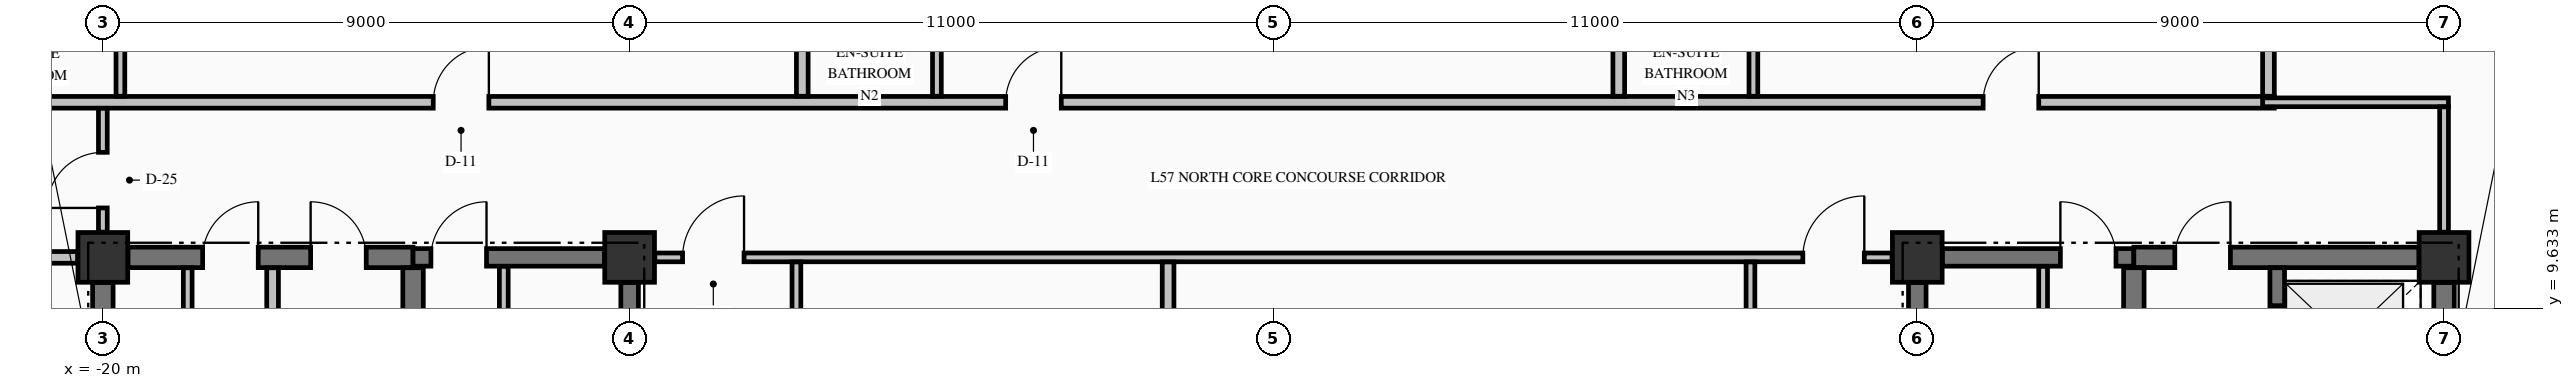
"""IFC4 building model, lengths in metres.
Left out: names, types, materials, properties, quantities, classifications, styles, units other than length and angle.
Written with IfcOpenShell. Run it as: python <this file> out.ifc"""

import sys

from ifc_helpers import new_model, si_unit, direction, frame, frame_2d, origin, origin_2d, place, context, subcontext, project, spatial, rectangle, extrude, element, fill, save


model = new_model("IFC4")
c1 = context("Model", 3, precision=1e-05, world=origin(), true_north=direction((0.0, 1.0)))
c2 = subcontext(c1, "Body", "Model", "MODEL_VIEW")
j1 = project(units=[si_unit("LENGTHUNIT", "METRE"), si_unit("PLANEANGLEUNIT", "RADIAN")], contexts=[c1])
p1 = place(None, origin())
s1 = spatial("IfcSite", under=j1, at=p1, CompositionType="ELEMENT")
p2 = place(p1, origin())
s2 = spatial("IfcBuilding", under=s1, at=p2, CompositionType="ELEMENT")
p3 = place(p2, frame((0.0, 0.0, 218.66)))
s3 = spatial("IfcBuildingStorey", under=s2, at=p3, CompositionType="ELEMENT", Elevation=218.66)
for number, where, z_axis, x_axis in (
    (1, (-20.0, 10.5, -0.25), (0.0, 0.0, 1.0), (1.0, 0.0, 0.0)),
    (2, (-11.0, 10.5, -0.25), (0.0, 0.0, 1.0), (1.0, 0.0, 0.0)),
    (3, (11.0, 10.5, -0.25), (0.0, 0.0, 1.0), (1.0, 0.0, 0.0)),
    (4, (20.0, 10.5, -0.25), (0.0, 0.0, 1.0), (1.0, 0.0, 0.0)),
):
    element("IfcColumn", number, at=place(p3, frame(where, z_axis=z_axis, x_axis=x_axis)), inside=s3, PredefinedType="COLUMN", context=c2, shape_type="SweptSolid", body=[
        extrude(rectangle(XDim=0.85, YDim=0.85, at=origin_2d()), origin(), (0.0, 0.0, 1.0), 3.225),
    ])
p4 = place(p3, frame((-19.571, 10.5, 0.0), z_axis=(0.0, 0.0, 1.0), x_axis=(1.0, 0.0, 0.0)))
e5 = element("IfcWall", 5, at=p4, inside=s3, PredefinedType="SHEAR", context=c2, shape_type="SweptSolid", body=[
    extrude(rectangle(XDim=4.871, YDim=0.35, at=frame_2d((2.436, 0.0))), origin(), (0.0, 0.0, 1.0), 2.975),
])
p5 = place(p4, frame((3.121, 0.0, 0.0)))
e6 = element("IfcOpeningElement", 6, at=p5, cuts=e5, PredefinedType="OPENING", context=c2, shape_type="SweptSolid", body=[
    extrude(rectangle(XDim=0.95, YDim=2.02, at=frame_2d((0.475, 1.01))), frame((0.0, 0.185, 0.0), z_axis=(0.0, -1.0, 0.0), x_axis=(1.0, 0.0, 0.0)), (0.0, 0.0, 1.0), 0.37),
])
p6 = place(p4, frame((1.276, 0.0, 0.0)))
e7 = element("IfcOpeningElement", 7, at=p6, cuts=e5, PredefinedType="OPENING", context=c2, shape_type="SweptSolid", body=[
    extrude(rectangle(XDim=0.95, YDim=2.02, at=frame_2d((0.475, 1.01))), frame((0.0, 0.185, 0.0), z_axis=(0.0, -1.0, 0.0), x_axis=(1.0, 0.0, 0.0)), (0.0, 0.0, 1.0), 0.37),
])
p7 = place(p3, frame((-14.7, 10.5, 0.0), z_axis=(0.0, 0.0, 1.0), x_axis=(1.0, 0.0, 0.0)))
e8 = element("IfcWall", 8, at=p7, inside=s3, PredefinedType="SHEAR", context=c2, shape_type="SweptSolid", body=[
    extrude(rectangle(XDim=3.271, YDim=0.3, at=frame_2d((1.635, 0.0))), origin(), (0.0, 0.0, 1.0), 2.975),
])
p8 = place(p7, frame((0.305, 0.0, 0.0)))
e9 = element("IfcOpeningElement", 9, at=p8, cuts=e8, PredefinedType="OPENING", context=c2, shape_type="SweptSolid", body=[
    extrude(rectangle(XDim=0.95, YDim=2.02, at=frame_2d((0.475, 1.01))), frame((0.0, 0.16, 0.0), z_axis=(0.0, -1.0, 0.0), x_axis=(1.0, 0.0, 0.0)), (0.0, 0.0, 1.0), 0.32),
])
p9 = place(p3, frame((11.429, 10.5, 0.0), z_axis=(0.0, 0.0, 1.0), x_axis=(1.0, 0.0, 0.0)))
e10 = element("IfcWall", 10, at=p9, inside=s3, PredefinedType="SHEAR", context=c2, shape_type="SweptSolid", body=[
    extrude(rectangle(XDim=3.271, YDim=0.3, at=frame_2d((1.635, 0.0))), origin(), (0.0, 0.0, 1.0), 2.975),
])
p10 = place(p9, frame((2.016, 0.0, 0.0)))
e11 = element("IfcOpeningElement", 11, at=p10, cuts=e10, PredefinedType="OPENING", context=c2, shape_type="SweptSolid", body=[
    extrude(rectangle(XDim=0.95, YDim=2.02, at=frame_2d((0.475, 1.01))), frame((0.0, 0.16, 0.0), z_axis=(0.0, -1.0, 0.0), x_axis=(1.0, 0.0, 0.0)), (0.0, 0.0, 1.0), 0.32),
])
p11 = place(p3, frame((14.7, 10.5, 0.0), z_axis=(0.0, 0.0, 1.0), x_axis=(1.0, 0.0, 0.0)))
e12 = element("IfcWall", 12, at=p11, inside=s3, PredefinedType="SHEAR", context=c2, shape_type="SweptSolid", body=[
    extrude(rectangle(XDim=4.871, YDim=0.35, at=frame_2d((2.436, 0.0))), origin(), (0.0, 0.0, 1.0), 2.975),
])
p12 = place(p11, frame((0.7, 0.0, 0.0)))
e13 = element("IfcOpeningElement", 13, at=p12, cuts=e12, PredefinedType="OPENING", context=c2, shape_type="SweptSolid", body=[
    extrude(rectangle(XDim=0.95, YDim=2.02, at=frame_2d((0.475, 1.01))), frame((0.0, 0.185, 0.0), z_axis=(0.0, -1.0, 0.0), x_axis=(1.0, 0.0, 0.0)), (0.0, 0.0, 1.0), 0.37),
])
p13 = place(p3, frame((-26.835, 10.5, 0.0), z_axis=(0.0, 0.0, 1.0), x_axis=(1.0, 0.0, 0.0)))
e14 = element("IfcWall", 14, at=p13, inside=s3, PredefinedType="PARTITIONING", context=c2, shape_type="SweptSolid", body=[
    extrude(rectangle(XDim=6.404, YDim=0.2, at=frame_2d((3.202, 0.0))), origin(), (0.0, 0.0, 1.0), 2.975),
])
p14 = place(p13, frame((2.86, 0.0, 0.0)))
e15 = element("IfcOpeningElement", 15, at=p14, cuts=e14, PredefinedType="OPENING", context=c2, shape_type="SweptSolid", body=[
    extrude(rectangle(XDim=0.95, YDim=2.15, at=frame_2d((0.475, 1.075))), frame((0.0, 0.11, 0.0), z_axis=(0.0, -1.0, 0.0), x_axis=(1.0, 0.0, 0.0)), (0.0, 0.0, 1.0), 0.22),
])
p15 = place(p3, frame((-10.569, 10.5, 0.0), z_axis=(0.0, 0.0, 1.0), x_axis=(1.0, 0.0, 0.0)))
e16 = element("IfcWall", 16, at=p15, inside=s3, PredefinedType="PARTITIONING", context=c2, shape_type="SweptSolid", body=[
    extrude(rectangle(XDim=21.138, YDim=0.15, at=frame_2d((10.569, 0.0))), origin(), (0.0, 0.0, 1.0), 2.975),
])
p16 = place(p15, frame((0.474, 0.0, 0.0)))
e17 = element("IfcOpeningElement", 17, at=p16, cuts=e16, PredefinedType="OPENING", context=c2, shape_type="SweptSolid", body=[
    extrude(rectangle(XDim=1.05, YDim=2.15, at=frame_2d((0.525, 1.075))), frame((0.0, 0.085, 0.0), z_axis=(0.0, -1.0, 0.0), x_axis=(1.0, 0.0, 0.0)), (0.0, 0.0, 1.0), 0.17),
])
p17 = place(p15, frame((19.614, 0.0, 0.0)))
e18 = element("IfcOpeningElement", 18, at=p17, cuts=e16, PredefinedType="OPENING", context=c2, shape_type="SweptSolid", body=[
    extrude(rectangle(XDim=1.05, YDim=2.15, at=frame_2d((0.525, 1.075))), frame((0.0, 0.085, 0.0), z_axis=(0.0, -1.0, 0.0), x_axis=(1.0, 0.0, 0.0)), (0.0, 0.0, 1.0), 0.17),
])
p18 = place(p3, frame((-22.1, 13.15, 0.0), z_axis=(0.0, 0.0, 1.0), x_axis=(1.0, 0.0, 0.0)))
e19 = element("IfcWall", 19, at=p18, inside=s3, PredefinedType="PARTITIONING", context=c2, shape_type="SweptSolid", body=[
    extrude(rectangle(XDim=39.2, YDim=0.2, at=frame_2d((19.6, 0.0))), origin(), (0.0, 0.0, 1.0), 2.975),
])
p19 = place(p18, frame((7.745, 0.0, 0.0)))
e20 = element("IfcOpeningElement", 20, at=p19, cuts=e19, PredefinedType="OPENING", context=c2, shape_type="SweptSolid", body=[
    extrude(rectangle(XDim=0.95, YDim=2.15, at=frame_2d((0.475, 1.075))), frame((0.0, 0.11, 0.0), z_axis=(0.0, -1.0, 0.0), x_axis=(1.0, 0.0, 0.0)), (0.0, 0.0, 1.0), 0.22),
])
p20 = place(p18, frame((17.525, 0.0, 0.0)))
e21 = element("IfcOpeningElement", 21, at=p20, cuts=e19, PredefinedType="OPENING", context=c2, shape_type="SweptSolid", body=[
    extrude(rectangle(XDim=0.95, YDim=2.15, at=frame_2d((0.475, 1.075))), frame((0.0, 0.11, 0.0), z_axis=(0.0, -1.0, 0.0), x_axis=(1.0, 0.0, 0.0)), (0.0, 0.0, 1.0), 0.22),
])
p21 = place(p18, frame((34.225, 0.0, 0.0)))
e22 = element("IfcOpeningElement", 22, at=p21, cuts=e19, PredefinedType="OPENING", context=c2, shape_type="SweptSolid", body=[
    extrude(rectangle(XDim=0.95, YDim=2.15, at=frame_2d((0.475, 1.075))), frame((0.0, 0.11, 0.0), z_axis=(0.0, -1.0, 0.0), x_axis=(1.0, 0.0, 0.0)), (0.0, 0.0, 1.0), 0.22),
])
p22 = place(p3, frame((16.9, 13.15, 0.0), z_axis=(0.0, 0.0, 1.0), x_axis=(1.0, 0.0, 0.0)))
e23 = element("IfcWall", 23, at=p22, inside=s3, PredefinedType="PARTITIONING", context=c2, shape_type="SweptSolid", body=[
    extrude(rectangle(XDim=3.175, YDim=0.15, at=frame_2d((1.587, 0.0))), origin(), (0.0, 0.0, 1.0), 2.975),
])
p23 = place(p3, frame((-20.0, 5.327, 0.0), z_axis=(0.0, 0.0, 1.0), x_axis=(0.0, 1.0, 0.0)))
e24 = element("IfcWall", 24, at=p23, inside=s3, PredefinedType="SHEAR", context=c2, shape_type="SweptSolid", body=[
    extrude(rectangle(XDim=4.744, YDim=0.35, at=frame_2d((2.372, 0.0))), origin(), (0.0, 0.0, 1.0), 2.975),
])
p24 = place(p3, frame((-14.7, 5.852, 0.0), z_axis=(0.0, 0.0, 1.0), x_axis=(0.0, 1.0, 0.0)))
e25 = element("IfcWall", 25, at=p24, inside=s3, PredefinedType="SHEAR", context=c2, shape_type="SweptSolid", body=[
    extrude(rectangle(XDim=4.471, YDim=0.35, at=frame_2d((2.235, 0.0))), origin(), (0.0, 0.0, 1.0), 2.975),
])
for number, where, z_axis, x_axis in (
    (26, (-11.0, 5.852, 0.0), (0.0, 0.0, 1.0), (0.0, 1.0, 0.0)),
    (27, (11.0, 5.852, 0.0), (0.0, 0.0, 1.0), (0.0, 1.0, 0.0)),
):
    element("IfcWall", number, at=place(p3, frame(where, z_axis=z_axis, x_axis=x_axis)), inside=s3, PredefinedType="SHEAR", context=c2, shape_type="SweptSolid", body=[
        extrude(rectangle(XDim=4.219, YDim=0.3, at=frame_2d((2.109, 0.0))), origin(), (0.0, 0.0, 1.0), 2.975),
    ])
p25 = place(p3, frame((14.7, 5.852, 0.0), z_axis=(0.0, 0.0, 1.0), x_axis=(0.0, 1.0, 0.0)))
e28 = element("IfcWall", 28, at=p25, inside=s3, PredefinedType="SHEAR", context=c2, shape_type="SweptSolid", body=[
    extrude(rectangle(XDim=4.471, YDim=0.35, at=frame_2d((2.235, 0.0))), origin(), (0.0, 0.0, 1.0), 2.975),
])
p26 = place(p3, frame((17.15, 7.877, 0.0), z_axis=(0.0, 0.0, 1.0), x_axis=(0.0, 1.0, 0.0)))
e29 = element("IfcWall", 29, at=p26, inside=s3, PredefinedType="SOLIDWALL", context=c2, shape_type="SweptSolid", body=[
    extrude(rectangle(XDim=2.446, YDim=0.25, at=frame_2d((1.223, 0.0))), origin(), (0.0, 0.0, 1.0), 2.975),
])
p27 = place(p26, frame((0.698, 0.0, 0.0)))
e30 = element("IfcOpeningElement", 30, at=p27, cuts=e29, PredefinedType="OPENING", context=c2, shape_type="SweptSolid", body=[
    extrude(rectangle(XDim=1.1, YDim=2.2, at=frame_2d((0.55, 1.1))), frame((0.0, 0.135, 0.0), z_axis=(0.0, -1.0, 0.0), x_axis=(1.0, 0.0, 0.0)), (0.0, 0.0, 1.0), 0.27),
])
p28 = place(p3, frame((20.0, 7.877, 0.0), z_axis=(0.0, 0.0, 1.0), x_axis=(0.0, 1.0, 0.0)))
e31 = element("IfcWall", 31, at=p28, inside=s3, PredefinedType="SHEAR", context=c2, shape_type="SweptSolid", body=[
    extrude(rectangle(XDim=2.194, YDim=0.35, at=frame_2d((1.097, 0.0))), origin(), (0.0, 0.0, 1.0), 2.975),
])
p29 = place(p3, frame((-20.0, 10.931, 0.0), z_axis=(0.0, 0.0, 1.0), x_axis=(0.0, 1.0, 0.0)))
e32 = element("IfcWall", 32, at=p29, inside=s3, PredefinedType="PARTITIONING", context=c2, shape_type="SweptSolid", body=[
    extrude(rectangle(XDim=2.116, YDim=0.15, at=frame_2d((1.058, 0.0))), origin(), (0.0, 0.0, 1.0), 2.167),
])
p30 = place(p29, frame((0.414, 0.0, 0.0)))
e33 = element("IfcOpeningElement", 33, at=p30, cuts=e32, PredefinedType="OPENING", context=c2, shape_type="SweptSolid", body=[
    extrude(rectangle(XDim=0.95, YDim=2.02, at=frame_2d((0.475, 1.01))), frame((0.0, 0.085, 0.0), z_axis=(0.0, -1.0, 0.0), x_axis=(1.0, 0.0, 0.0)), (0.0, 0.0, 1.0), 0.17),
])
p31 = place(p3, frame((-19.7, 13.253, 0.0), z_axis=(0.0, 0.0, 1.0), x_axis=(0.0, 1.0, 0.0)))
e34 = element("IfcWall", 34, at=p31, inside=s3, PredefinedType="PARTITIONING", context=c2, shape_type="SweptSolid", body=[
    extrude(rectangle(XDim=2.069, YDim=0.15, at=frame_2d((1.035, 0.0))), origin(), (0.0, 0.0, 1.0), 2.167),
])
p32 = place(p3, frame((-18.55, 5.328, 0.0), z_axis=(0.0, 0.0, 1.0), x_axis=(0.0, 1.0, 0.0)))
e35 = element("IfcWall", 35, at=p32, inside=s3, PredefinedType="PARTITIONING", context=c2, shape_type="SweptSolid", body=[
    extrude(rectangle(XDim=4.994, YDim=0.15, at=frame_2d((2.497, 0.0))), origin(), (0.0, 0.0, 1.0), 2.975),
])
p33 = place(p32, frame((2.047, 0.0, 0.0)))
e36 = element("IfcOpeningElement", 36, at=p33, cuts=e35, PredefinedType="OPENING", context=c2, shape_type="SweptSolid", body=[
    extrude(rectangle(XDim=0.95, YDim=2.15, at=frame_2d((0.475, 1.075))), frame((0.0, 0.085, 0.0), z_axis=(0.0, -1.0, 0.0), x_axis=(1.0, 0.0, 0.0)), (0.0, 0.0, 1.0), 0.17),
])
p34 = place(p3, frame((-17.1, 5.328, 0.0), z_axis=(0.0, 0.0, 1.0), x_axis=(0.0, 1.0, 0.0)))
e37 = element("IfcWall", 37, at=p34, inside=s3, PredefinedType="PARTITIONING", context=c2, shape_type="SweptSolid", body=[
    extrude(rectangle(XDim=4.994, YDim=0.2, at=frame_2d((2.497, 0.0))), origin(), (0.0, 0.0, 1.0), 2.975),
])
p35 = place(p3, frame((-13.15, 7.228, 0.0), z_axis=(0.0, 0.0, 1.0), x_axis=(0.0, 1.0, 0.0)))
e38 = element("IfcWall", 38, at=p35, inside=s3, PredefinedType="PARTITIONING", context=c2, shape_type="SweptSolid", body=[
    extrude(rectangle(XDim=3.119, YDim=0.15, at=frame_2d((1.56, 0.0))), origin(), (0.0, 0.0, 1.0), 2.975),
])
p36 = place(p35, frame((1.097, 0.0, 0.0)))
e39 = element("IfcOpeningElement", 39, at=p36, cuts=e38, PredefinedType="OPENING", context=c2, shape_type="SweptSolid", body=[
    extrude(rectangle(XDim=0.95, YDim=2.15, at=frame_2d((0.475, 1.075))), frame((0.0, 0.085, 0.0), z_axis=(0.0, -1.0, 0.0), x_axis=(1.0, 0.0, 0.0)), (0.0, 0.0, 1.0), 0.17),
])
p37 = place(p3, frame((-8.15, -2.497, 0.0), z_axis=(0.0, 0.0, 1.0), x_axis=(0.0, 1.0, 0.0)))
e40 = element("IfcWall", 40, at=p37, inside=s3, PredefinedType="PARTITIONING", context=c2, shape_type="SweptSolid", body=[
    extrude(rectangle(XDim=12.919, YDim=0.15, at=frame_2d((6.459, 0.0))), origin(), (0.0, 0.0, 1.0), 2.975),
])
p38 = place(p37, frame((5.897, 0.0, 0.0)))
e41 = element("IfcOpeningElement", 41, at=p38, cuts=e40, PredefinedType="OPENING", context=c2, shape_type="SweptSolid", body=[
    extrude(rectangle(XDim=1.1, YDim=2.15, at=frame_2d((0.55, 1.075))), frame((0.0, 0.085, 0.0), z_axis=(0.0, -1.0, 0.0), x_axis=(1.0, 0.0, 0.0)), (0.0, 0.0, 1.0), 0.17),
])
p39 = place(p3, frame((-8.05, 13.253, 0.0), z_axis=(0.0, 0.0, 1.0), x_axis=(0.0, 1.0, 0.0)))
e42 = element("IfcWall", 42, at=p39, inside=s3, PredefinedType="PARTITIONING", context=c2, shape_type="SweptSolid", body=[
    extrude(rectangle(XDim=2.069, YDim=0.2, at=frame_2d((1.035, 0.0))), origin(), (0.0, 0.0, 1.0), 2.975),
])
p40 = place(p3, frame((-5.75, 13.253, 0.0), z_axis=(0.0, 0.0, 1.0), x_axis=(0.0, 1.0, 0.0)))
e43 = element("IfcWall", 43, at=p40, inside=s3, PredefinedType="PARTITIONING", context=c2, shape_type="SweptSolid", body=[
    extrude(rectangle(XDim=2.069, YDim=0.15, at=frame_2d((1.035, 0.0))), origin(), (0.0, 0.0, 1.0), 2.975),
])
p41 = place(p3, frame((-1.8, -1.497, 0.0), z_axis=(0.0, 0.0, 1.0), x_axis=(0.0, 1.0, 0.0)))
e44 = element("IfcWall", 44, at=p41, inside=s3, PredefinedType="PARTITIONING", context=c2, shape_type="SweptSolid", body=[
    extrude(rectangle(XDim=11.919, YDim=0.2, at=frame_2d((5.959, 0.0))), origin(), (0.0, 0.0, 1.0), 2.975),
])
p42 = place(p3, frame((5.9, 13.253, 0.0), z_axis=(0.0, 0.0, 1.0), x_axis=(0.0, 1.0, 0.0)))
e45 = element("IfcWall", 45, at=p42, inside=s3, PredefinedType="PARTITIONING", context=c2, shape_type="SweptSolid", body=[
    extrude(rectangle(XDim=2.069, YDim=0.2, at=frame_2d((1.035, 0.0))), origin(), (0.0, 0.0, 1.0), 2.975),
])
p43 = place(p3, frame((8.15, -1.497, 0.0), z_axis=(0.0, 0.0, 1.0), x_axis=(0.0, 1.0, 0.0)))
e46 = element("IfcWall", 46, at=p43, inside=s3, PredefinedType="PARTITIONING", context=c2, shape_type="SweptSolid", body=[
    extrude(rectangle(XDim=11.919, YDim=0.15, at=frame_2d((5.959, 0.0))), origin(), (0.0, 0.0, 1.0), 2.975),
])
p44 = place(p43, frame((5.397, 0.0, 0.0)))
e47 = element("IfcOpeningElement", 47, at=p44, cuts=e46, PredefinedType="OPENING", context=c2, shape_type="SweptSolid", body=[
    extrude(rectangle(XDim=1.1, YDim=2.15, at=frame_2d((0.55, 1.075))), frame((0.0, 0.085, 0.0), z_axis=(0.0, -1.0, 0.0), x_axis=(1.0, 0.0, 0.0)), (0.0, 0.0, 1.0), 0.17),
])
p45 = place(p3, frame((8.2, 13.253, 0.0), z_axis=(0.0, 0.0, 1.0), x_axis=(0.0, 1.0, 0.0)))
e48 = element("IfcWall", 48, at=p45, inside=s3, PredefinedType="PARTITIONING", context=c2, shape_type="SweptSolid", body=[
    extrude(rectangle(XDim=2.069, YDim=0.15, at=frame_2d((1.035, 0.0))), origin(), (0.0, 0.0, 1.0), 2.975),
])
p46 = place(p3, frame((13.15, 7.228, 0.0), z_axis=(0.0, 0.0, 1.0), x_axis=(0.0, 1.0, 0.0)))
e49 = element("IfcWall", 49, at=p46, inside=s3, PredefinedType="PARTITIONING", context=c2, shape_type="SweptSolid", body=[
    extrude(rectangle(XDim=3.119, YDim=0.15, at=frame_2d((1.56, 0.0))), origin(), (0.0, 0.0, 1.0), 2.975),
])
p47 = place(p46, frame((1.097, 0.0, 0.0)))
e50 = element("IfcOpeningElement", 50, at=p47, cuts=e49, PredefinedType="OPENING", context=c2, shape_type="SweptSolid", body=[
    extrude(rectangle(XDim=0.95, YDim=2.15, at=frame_2d((0.475, 1.075))), frame((0.0, 0.085, 0.0), z_axis=(0.0, -1.0, 0.0), x_axis=(1.0, 0.0, 0.0)), (0.0, 0.0, 1.0), 0.17),
])
p48 = place(p3, frame((17.0, 13.253, 0.0), z_axis=(0.0, 0.0, 1.0), x_axis=(0.0, 1.0, 0.0)))
e51 = element("IfcWall", 51, at=p48, inside=s3, PredefinedType="PARTITIONING", context=c2, shape_type="SweptSolid", body=[
    extrude(rectangle(XDim=5.741, YDim=0.2, at=frame_2d((2.871, 0.0))), origin(), (0.0, 0.0, 1.0), 2.975),
])
p49 = place(p3, frame((20.0, 10.931, 0.0), z_axis=(0.0, 0.0, 1.0), x_axis=(0.0, 1.0, 0.0)))
e52 = element("IfcWall", 52, at=p49, inside=s3, PredefinedType="PARTITIONING", context=c2, shape_type="SweptSolid", body=[
    extrude(rectangle(XDim=2.141, YDim=0.15, at=frame_2d((1.071, 0.0))), origin(), (0.0, 0.0, 1.0), 2.167),
])
p50 = place(p8, origin())
e53 = element("IfcDoor", 53, at=p50, inside=s3, OperationType="SINGLE_SWING_RIGHT", PredefinedType="DOOR", context=c2, shape_type="SweptSolid", body=[
    extrude(rectangle(XDim=0.95, YDim=2.02, at=frame_2d((0.475, 1.01))), frame((0.0, 0.025, 0.0), z_axis=(0.0, -1.0, 0.0), x_axis=(1.0, 0.0, 0.0)), (0.0, 0.0, 1.0), 0.05),
])
fill(e9, e53)
p51 = place(p10, origin())
e54 = element("IfcDoor", 54, at=p51, inside=s3, OperationType="SINGLE_SWING_LEFT", PredefinedType="DOOR", context=c2, shape_type="SweptSolid", body=[
    extrude(rectangle(XDim=0.95, YDim=2.02, at=frame_2d((0.475, 1.01))), frame((0.0, 0.025, 0.0), z_axis=(0.0, -1.0, 0.0), x_axis=(1.0, 0.0, 0.0)), (0.0, 0.0, 1.0), 0.05),
])
fill(e11, e54)
p52 = place(p5, origin())
e55 = element("IfcDoor", 55, at=p52, inside=s3, OperationType="SINGLE_SWING_LEFT", PredefinedType="DOOR", context=c2, shape_type="SweptSolid", body=[
    extrude(rectangle(XDim=0.95, YDim=2.02, at=frame_2d((0.475, 1.01))), frame((0.0, 0.025, 0.0), z_axis=(0.0, -1.0, 0.0), x_axis=(1.0, 0.0, 0.0)), (0.0, 0.0, 1.0), 0.05),
])
fill(e6, e55)
p53 = place(p6, origin())
e56 = element("IfcDoor", 56, at=p53, inside=s3, OperationType="SINGLE_SWING_RIGHT", PredefinedType="DOOR", context=c2, shape_type="SweptSolid", body=[
    extrude(rectangle(XDim=0.95, YDim=2.02, at=frame_2d((0.475, 1.01))), frame((0.0, 0.025, 0.0), z_axis=(0.0, -1.0, 0.0), x_axis=(1.0, 0.0, 0.0)), (0.0, 0.0, 1.0), 0.05),
])
fill(e7, e56)
p54 = place(p27, origin())
e57 = element("IfcDoor", 57, at=p54, inside=s3, OperationType="SLIDING_TO_RIGHT", PredefinedType="DOOR", context=c2, shape_type="SweptSolid", body=[
    extrude(rectangle(XDim=1.1, YDim=2.2, at=frame_2d((0.55, 1.1))), frame((0.0, 0.025, 0.0), z_axis=(0.0, -1.0, 0.0), x_axis=(1.0, 0.0, 0.0)), (0.0, 0.0, 1.0), 0.05),
])
fill(e30, e57)
p55 = place(p12, origin())
e58 = element("IfcDoor", 58, at=p55, inside=s3, OperationType="SINGLE_SWING_RIGHT", PredefinedType="DOOR", context=c2, shape_type="SweptSolid", body=[
    extrude(rectangle(XDim=0.95, YDim=2.02, at=frame_2d((0.475, 1.01))), frame((0.0, 0.025, 0.0), z_axis=(0.0, -1.0, 0.0), x_axis=(1.0, 0.0, 0.0)), (0.0, 0.0, 1.0), 0.05),
])
fill(e13, e58)
p56 = place(p16, origin())
e59 = element("IfcDoor", 59, at=p56, inside=s3, OperationType="SINGLE_SWING_RIGHT", PredefinedType="DOOR", context=c2, shape_type="SweptSolid", body=[
    extrude(rectangle(XDim=1.05, YDim=2.15, at=frame_2d((0.525, 1.075))), frame((0.0, 0.025, 0.0), z_axis=(0.0, -1.0, 0.0), x_axis=(1.0, 0.0, 0.0)), (0.0, 0.0, 1.0), 0.05),
])
fill(e17, e59)
p57 = place(p17, origin())
e60 = element("IfcDoor", 60, at=p57, inside=s3, OperationType="SINGLE_SWING_RIGHT", PredefinedType="DOOR", context=c2, shape_type="SweptSolid", body=[
    extrude(rectangle(XDim=1.05, YDim=2.15, at=frame_2d((0.525, 1.075))), frame((0.0, 0.025, 0.0), z_axis=(0.0, -1.0, 0.0), x_axis=(1.0, 0.0, 0.0)), (0.0, 0.0, 1.0), 0.05),
])
fill(e18, e60)
p58 = place(p19, origin())
e61 = element("IfcDoor", 61, at=p58, inside=s3, OperationType="SINGLE_SWING_RIGHT", PredefinedType="DOOR", context=c2, shape_type="SweptSolid", body=[
    extrude(rectangle(XDim=0.95, YDim=2.15, at=frame_2d((0.475, 1.075))), frame((0.0, 0.025, 0.0), z_axis=(0.0, -1.0, 0.0), x_axis=(1.0, 0.0, 0.0)), (0.0, 0.0, 1.0), 0.05),
])
fill(e20, e61)
p59 = place(p20, origin())
e62 = element("IfcDoor", 62, at=p59, inside=s3, OperationType="SINGLE_SWING_RIGHT", PredefinedType="DOOR", context=c2, shape_type="SweptSolid", body=[
    extrude(rectangle(XDim=0.95, YDim=2.15, at=frame_2d((0.475, 1.075))), frame((0.0, 0.025, 0.0), z_axis=(0.0, -1.0, 0.0), x_axis=(1.0, 0.0, 0.0)), (0.0, 0.0, 1.0), 0.05),
])
fill(e21, e62)
p60 = place(p21, origin())
e63 = element("IfcDoor", 63, at=p60, inside=s3, OperationType="SINGLE_SWING_RIGHT", PredefinedType="DOOR", context=c2, shape_type="SweptSolid", body=[
    extrude(rectangle(XDim=0.95, YDim=2.15, at=frame_2d((0.475, 1.075))), frame((0.0, 0.025, 0.0), z_axis=(0.0, -1.0, 0.0), x_axis=(1.0, 0.0, 0.0)), (0.0, 0.0, 1.0), 0.05),
])
fill(e22, e63)
p61 = place(p30, origin())
e64 = element("IfcDoor", 64, at=p61, inside=s3, OperationType="SINGLE_SWING_LEFT", PredefinedType="DOOR", context=c2, shape_type="SweptSolid", body=[
    extrude(rectangle(XDim=0.95, YDim=2.02, at=frame_2d((0.475, 1.01))), frame((0.0, 0.025, 0.0), z_axis=(0.0, -1.0, 0.0), x_axis=(1.0, 0.0, 0.0)), (0.0, 0.0, 1.0), 0.05),
])
fill(e33, e64)
save(model, sys.argv[1])
